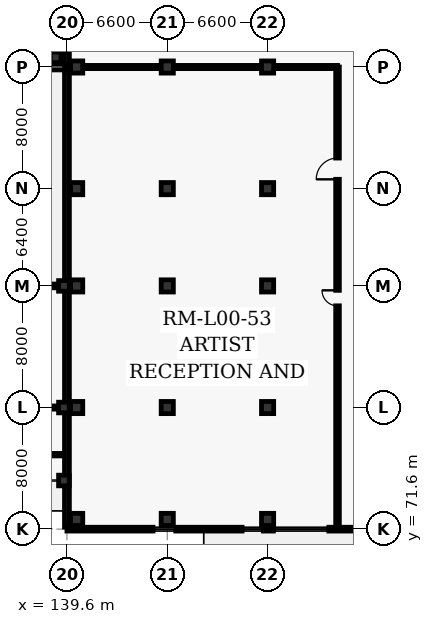
"""IFC4 building model, lengths in metres.
Left out: names, types, materials, properties, quantities, classifications, styles, units other than length and angle.
Written with IfcOpenShell. Run it as: python <this file> out.ifc"""

import sys

from ifc_helpers import new_model, si_unit, direction, frame, frame_2d, origin, origin_2d, place, context, subcontext, project, spatial, rectangle, extrude, element, fill, save


model = new_model("IFC4")
c1 = context("Model", 3, precision=1e-05, world=origin(), true_north=direction((0.0, 1.0)))
c2 = subcontext(c1, "Body", "Model", "MODEL_VIEW")
j1 = project(units=[si_unit("LENGTHUNIT", "METRE"), si_unit("PLANEANGLEUNIT", "RADIAN")], contexts=[c1])
p1 = place(None, origin())
s1 = spatial("IfcSite", under=j1, at=p1, CompositionType="ELEMENT")
p2 = place(p1, origin())
s2 = spatial("IfcBuilding", under=s1, at=p2, CompositionType="ELEMENT")
p3 = place(p2, origin())
s3 = spatial("IfcBuildingStorey", under=s2, at=p3, CompositionType="ELEMENT", Elevation=0.0)
for number, where, z_axis, x_axis in (
    (1, (138.86, 102.64, 0.0), (0.0, 0.0, 1.0), (1.0, 0.0, 0.0)),
    (2, (139.4, 74.8, 0.0), (0.0, 0.0, 1.0), (1.0, 0.0, 0.0)),
    (3, (139.4, 79.6, 0.0), (0.0, 0.0, 1.0), (1.0, 0.0, 0.0)),
    (4, (139.4, 87.6, 0.0), (0.0, 0.0, 1.0), (1.0, 0.0, 0.0)),
):
    element("IfcColumn", number, at=place(p3, frame(where, z_axis=z_axis, x_axis=x_axis)), inside=s3, PredefinedType="COLUMN", context=c2, shape_type="SweptSolid", body=[
        extrude(rectangle(XDim=0.7, YDim=0.7, at=origin_2d()), origin(), (0.0, 0.0, 1.0), 5.4),
    ])
for number, where, z_axis, x_axis in (
    (5, (140.24, 72.24, 0.0), (0.0, 0.0, 1.0), (1.0, 0.0, 0.0)),
    (6, (140.24, 79.6, 0.0), (0.0, 0.0, 1.0), (1.0, 0.0, 0.0)),
    (7, (140.24, 87.6, 0.0), (0.0, 0.0, 1.0), (1.0, 0.0, 0.0)),
    (8, (140.24, 94.0, 0.0), (0.0, 0.0, 1.0), (1.0, 0.0, 0.0)),
    (9, (140.24, 102.0, 0.0), (0.0, 0.0, 1.0), (1.0, 0.0, 0.0)),
    (10, (146.2, 72.24, 0.0), (0.0, 0.0, 1.0), (1.0, 0.0, 0.0)),
    (11, (146.2, 79.6, 0.0), (0.0, 0.0, 1.0), (1.0, 0.0, 0.0)),
    (12, (146.2, 87.6, 0.0), (0.0, 0.0, 1.0), (1.0, 0.0, 0.0)),
    (13, (146.2, 94.0, 0.0), (0.0, 0.0, 1.0), (1.0, 0.0, 0.0)),
    (14, (146.2, 102.0, 0.0), (0.0, 0.0, 1.0), (1.0, 0.0, 0.0)),
    (15, (152.8, 72.24, 0.0), (0.0, 0.0, 1.0), (1.0, 0.0, 0.0)),
    (16, (152.8, 79.6, 0.0), (0.0, 0.0, 1.0), (1.0, 0.0, 0.0)),
    (17, (152.8, 87.6, 0.0), (0.0, 0.0, 1.0), (1.0, 0.0, 0.0)),
    (18, (152.8, 94.0, 0.0), (0.0, 0.0, 1.0), (1.0, 0.0, 0.0)),
    (19, (152.8, 102.0, 0.0), (0.0, 0.0, 1.0), (1.0, 0.0, 0.0)),
):
    element("IfcColumn", number, at=place(p3, frame(where, z_axis=z_axis, x_axis=x_axis)), inside=s3, PredefinedType="COLUMN", context=c2, shape_type="SweptSolid", body=[
        extrude(rectangle(XDim=0.8, YDim=0.8, at=origin_2d()), origin(), (0.0, 0.0, 1.0), 5.4),
    ])
p4 = place(p3, frame((139.5, 102.0, 0.0), z_axis=(0.0, 0.0, 1.0), x_axis=(-1.0, 0.0, 0.0)))
e20 = element("IfcWall", 20, at=p4, inside=s3, PredefinedType="SOLIDWALL", context=c2, shape_type="SweptSolid", body=[
    extrude(rectangle(XDim=44.7, YDim=0.38, at=frame_2d((22.35, 0.0))), origin(), (0.0, 0.0, 1.0), 5.12),
])
p5 = place(p4, frame((39.7, 0.0, 0.0)))
e21 = element("IfcOpeningElement", 21, at=p5, cuts=e20, PredefinedType="OPENING", context=c2, shape_type="SweptSolid", body=[
    extrude(rectangle(XDim=2.0, YDim=2.5, at=frame_2d((1.0, 1.25))), frame((0.0, 0.2, 0.0), z_axis=(0.0, -1.0, 0.0), x_axis=(1.0, 0.0, 0.0)), (0.0, 0.0, 1.0), 0.4),
])
p6 = place(p4, frame((2.2, 0.0, 0.9)))
e22 = element("IfcOpeningElement", 22, at=p6, cuts=e20, PredefinedType="OPENING", context=c2, shape_type="SweptSolid", body=[
    extrude(rectangle(XDim=3.2, YDim=2.5, at=frame_2d((1.6, 1.25))), frame((0.0, 0.2, 0.0), z_axis=(0.0, -1.0, 0.0), x_axis=(1.0, 0.0, 0.0)), (0.0, 0.0, 1.0), 0.4),
])
p7 = place(p4, frame((9.05, 0.0, 0.9)))
e23 = element("IfcOpeningElement", 23, at=p7, cuts=e20, PredefinedType="OPENING", context=c2, shape_type="SweptSolid", body=[
    extrude(rectangle(XDim=3.3, YDim=2.5, at=frame_2d((1.65, 1.25))), frame((0.0, 0.2, 0.0), z_axis=(0.0, -1.0, 0.0), x_axis=(1.0, 0.0, 0.0)), (0.0, 0.0, 1.0), 0.4),
])
p8 = place(p4, frame((15.9, 0.0, 0.9)))
e24 = element("IfcOpeningElement", 24, at=p8, cuts=e20, PredefinedType="OPENING", context=c2, shape_type="SweptSolid", body=[
    extrude(rectangle(XDim=3.4, YDim=2.55, at=frame_2d((1.7, 1.275))), frame((0.0, 0.2, 0.0), z_axis=(0.0, -1.0, 0.0), x_axis=(1.0, 0.0, 0.0)), (0.0, 0.0, 1.0), 0.4),
])
p9 = place(p4, frame((22.75, 0.0, 0.9)))
e25 = element("IfcOpeningElement", 25, at=p9, cuts=e20, PredefinedType="OPENING", context=c2, shape_type="SweptSolid", body=[
    extrude(rectangle(XDim=3.5, YDim=2.55, at=frame_2d((1.75, 1.275))), frame((0.0, 0.2, 0.0), z_axis=(0.0, -1.0, 0.0), x_axis=(1.0, 0.0, 0.0)), (0.0, 0.0, 1.0), 0.4),
])
p10 = place(p4, frame((29.6, 0.0, 0.9)))
e26 = element("IfcOpeningElement", 26, at=p10, cuts=e20, PredefinedType="OPENING", context=c2, shape_type="SweptSolid", body=[
    extrude(rectangle(XDim=3.6, YDim=2.6, at=frame_2d((1.8, 1.3))), frame((0.0, 0.2, 0.0), z_axis=(0.0, -1.0, 0.0), x_axis=(1.0, 0.0, 0.0)), (0.0, 0.0, 1.0), 0.4),
])
p11 = place(p4, frame((35.0, 0.0, 0.9)))
e27 = element("IfcOpeningElement", 27, at=p11, cuts=e20, PredefinedType="OPENING", context=c2, shape_type="SweptSolid", body=[
    extrude(rectangle(XDim=3.8, YDim=2.6, at=frame_2d((1.9, 1.3))), frame((0.0, 0.2, 0.0), z_axis=(0.0, -1.0, 0.0), x_axis=(1.0, 0.0, 0.0)), (0.0, 0.0, 1.0), 0.4),
])
p12 = place(p3, frame((54.8, 87.6, 0.0), z_axis=(0.0, 0.0, 1.0), x_axis=(1.0, 0.0, 0.0)))
e28 = element("IfcWall", 28, at=p12, inside=s3, PredefinedType="SOLIDWALL", context=c2, shape_type="SweptSolid", body=[
    extrude(rectangle(XDim=84.6, YDim=0.25, at=frame_2d((42.3, 0.0))), origin(), (0.0, 0.0, 1.0), 4.29),
])
p13 = place(p12, frame((34.625, 0.0, 0.0)))
e29 = element("IfcOpeningElement", 29, at=p13, cuts=e28, PredefinedType="OPENING", context=c2, shape_type="SweptSolid", body=[
    extrude(rectangle(XDim=1.15, YDim=2.2, at=frame_2d((0.575, 1.1))), frame((0.0, 0.135, 0.0), z_axis=(0.0, -1.0, 0.0), x_axis=(1.0, 0.0, 0.0)), (0.0, 0.0, 1.0), 0.27),
])
p14 = place(p12, frame((62.2, 0.0, 0.0)))
e30 = element("IfcOpeningElement", 30, at=p14, cuts=e28, PredefinedType="OPENING", context=c2, shape_type="SweptSolid", body=[
    extrude(rectangle(XDim=2.0, YDim=2.5, at=frame_2d((1.0, 1.25))), frame((0.0, 0.135, 0.0), z_axis=(0.0, -1.0, 0.0), x_axis=(1.0, 0.0, 0.0)), (0.0, 0.0, 1.0), 0.27),
])
p15 = place(p12, frame((2.2, 0.0, 0.9)))
e31 = element("IfcOpeningElement", 31, at=p15, cuts=e28, PredefinedType="OPENING", context=c2, shape_type="SweptSolid", body=[
    extrude(rectangle(XDim=2.0, YDim=1.7, at=frame_2d((1.0, 0.85))), frame((0.0, 0.135, 0.0), z_axis=(0.0, -1.0, 0.0), x_axis=(1.0, 0.0, 0.0)), (0.0, 0.0, 1.0), 0.27),
])
p16 = place(p12, frame((15.7, 0.0, 0.9)))
e32 = element("IfcOpeningElement", 32, at=p16, cuts=e28, PredefinedType="OPENING", context=c2, shape_type="SweptSolid", body=[
    extrude(rectangle(XDim=2.2, YDim=1.7, at=frame_2d((1.1, 0.85))), frame((0.0, 0.135, 0.0), z_axis=(0.0, -1.0, 0.0), x_axis=(1.0, 0.0, 0.0)), (0.0, 0.0, 1.0), 0.27),
])
p17 = place(p12, frame((29.2, 0.0, 0.9)))
e33 = element("IfcOpeningElement", 33, at=p17, cuts=e28, PredefinedType="OPENING", context=c2, shape_type="SweptSolid", body=[
    extrude(rectangle(XDim=1.6, YDim=1.65, at=frame_2d((0.8, 0.825))), frame((0.0, 0.135, 0.0), z_axis=(0.0, -1.0, 0.0), x_axis=(1.0, 0.0, 0.0)), (0.0, 0.0, 1.0), 0.27),
])
p18 = place(p12, frame((42.7, 0.0, 0.9)))
e34 = element("IfcOpeningElement", 34, at=p18, cuts=e28, PredefinedType="OPENING", context=c2, shape_type="SweptSolid", body=[
    extrude(rectangle(XDim=2.6, YDim=1.75, at=frame_2d((1.3, 0.875))), frame((0.0, 0.135, 0.0), z_axis=(0.0, -1.0, 0.0), x_axis=(1.0, 0.0, 0.0)), (0.0, 0.0, 1.0), 0.27),
])
p19 = place(p12, frame((56.95, 0.0, 0.9)))
e35 = element("IfcOpeningElement", 35, at=p19, cuts=e28, PredefinedType="OPENING", context=c2, shape_type="SweptSolid", body=[
    extrude(rectangle(XDim=2.8, YDim=1.8, at=frame_2d((1.4, 0.9))), frame((0.0, 0.135, 0.0), z_axis=(0.0, -1.0, 0.0), x_axis=(1.0, 0.0, 0.0)), (0.0, 0.0, 1.0), 0.27),
])
p20 = place(p12, frame((68.25, 0.0, 0.9)))
e36 = element("IfcOpeningElement", 36, at=p20, cuts=e28, PredefinedType="OPENING", context=c2, shape_type="SweptSolid", body=[
    extrude(rectangle(XDim=3.0, YDim=1.8, at=frame_2d((1.5, 0.9))), frame((0.0, 0.135, 0.0), z_axis=(0.0, -1.0, 0.0), x_axis=(1.0, 0.0, 0.0)), (0.0, 0.0, 1.0), 0.27),
])
p21 = place(p3, frame((172.0, 71.6, 0.0), z_axis=(0.0, 0.0, 1.0), x_axis=(-1.0, 0.0, 0.0)))
e37 = element("IfcWall", 37, at=p21, inside=s3, PredefinedType="SOLIDWALL", context=c2, shape_type="SweptSolid", body=[
    extrude(rectangle(XDim=32.4, YDim=0.25, at=frame_2d((16.2, 0.0))), origin(), (0.0, 0.0, 1.0), 4.45),
])
p22 = place(p21, frame((1.9, 0.0, 0.0)))
e38 = element("IfcOpeningElement", 38, at=p22, cuts=e37, PredefinedType="OPENING", context=c2, shape_type="SweptSolid", body=[
    extrude(rectangle(XDim=2.0, YDim=2.5, at=frame_2d((1.0, 1.25))), frame((0.0, 0.135, 0.0), z_axis=(0.0, -1.0, 0.0), x_axis=(1.0, 0.0, 0.0)), (0.0, 0.0, 1.0), 0.27),
])
p23 = place(p21, frame((7.96, 0.0, 0.8)))
e39 = element("IfcOpeningElement", 39, at=p23, cuts=e37, PredefinedType="OPENING", context=c2, shape_type="SweptSolid", body=[
    extrude(rectangle(XDim=3.35, YDim=2.9, at=frame_2d((1.675, 1.45))), frame((0.0, 0.135, 0.0), z_axis=(0.0, -1.0, 0.0), x_axis=(1.0, 0.0, 0.0)), (0.0, 0.0, 1.0), 0.27),
])
p24 = place(p21, frame((15.17, 0.0, 0.8)))
e40 = element("IfcOpeningElement", 40, at=p24, cuts=e37, PredefinedType="OPENING", context=c2, shape_type="SweptSolid", body=[
    extrude(rectangle(XDim=3.65, YDim=2.9, at=frame_2d((1.825, 1.45))), frame((0.0, 0.135, 0.0), z_axis=(0.0, -1.0, 0.0), x_axis=(1.0, 0.0, 0.0)), (0.0, 0.0, 1.0), 0.27),
])
p25 = place(p21, frame((19.48, 0.0, 0.8)))
e41 = element("IfcOpeningElement", 41, at=p25, cuts=e37, PredefinedType="OPENING", context=c2, shape_type="SweptSolid", body=[
    extrude(rectangle(XDim=1.4, YDim=2.1, at=frame_2d((0.7, 1.05))), frame((0.0, 0.135, 0.0), z_axis=(0.0, -1.0, 0.0), x_axis=(1.0, 0.0, 0.0)), (0.0, 0.0, 1.0), 0.27),
])
p26 = place(p21, frame((25.24, 0.0, 0.8)))
e42 = element("IfcOpeningElement", 42, at=p26, cuts=e37, PredefinedType="OPENING", context=c2, shape_type="SweptSolid", body=[
    extrude(rectangle(XDim=1.5, YDim=2.1, at=frame_2d((0.75, 1.05))), frame((0.0, 0.135, 0.0), z_axis=(0.0, -1.0, 0.0), x_axis=(1.0, 0.0, 0.0)), (0.0, 0.0, 1.0), 0.27),
])
p27 = place(p3, frame((139.6, 71.74, 0.0), z_axis=(0.0, 0.0, 1.0), x_axis=(0.0, 1.0, 0.0)))
e43 = element("IfcWall", 43, at=p27, inside=s3, PredefinedType="SOLIDWALL", context=c2, shape_type="SweptSolid", body=[
    extrude(rectangle(XDim=46.12, YDim=0.32, at=frame_2d((23.06, 0.0))), origin(), (0.0, 0.0, 1.0), 4.29),
])
p28 = place(p27, frame((31.38, 0.0, 0.0)))
e44 = element("IfcOpeningElement", 44, at=p28, cuts=e43, PredefinedType="OPENING", context=c2, shape_type="SweptSolid", body=[
    extrude(rectangle(XDim=1.4, YDim=2.25, at=frame_2d((0.7, 1.125))), frame((0.0, 0.17, 0.0), z_axis=(0.0, -1.0, 0.0), x_axis=(1.0, 0.0, 0.0)), (0.0, 0.0, 1.0), 0.34),
])
p29 = place(p3, frame((139.4, 76.5, 0.0), z_axis=(0.0, 0.0, 1.0), x_axis=(-1.0, 0.0, 0.0)))
e45 = element("IfcWall", 45, at=p29, inside=s3, PredefinedType="PARTITIONING", context=c2, shape_type="SweptSolid", body=[
    extrude(rectangle(XDim=44.6, YDim=0.165, at=frame_2d((22.3, 0.0))), origin(), (0.0, 0.0, 1.0), 5.14),
])
p30 = place(p29, frame((21.825, 0.0, 0.0)))
e46 = element("IfcOpeningElement", 46, at=p30, cuts=e45, PredefinedType="OPENING", context=c2, shape_type="SweptSolid", body=[
    extrude(rectangle(XDim=0.95, YDim=2.1, at=frame_2d((0.475, 1.05))), frame((0.0, 0.093, 0.0), z_axis=(0.0, -1.0, 0.0), x_axis=(1.0, 0.0, 0.0)), (0.0, 0.0, 1.0), 0.185),
])
p31 = place(p3, frame((95.152, 79.6, 0.0), z_axis=(0.0, 0.0, 1.0), x_axis=(1.0, 0.0, 0.0)))
e47 = element("IfcWall", 47, at=p31, inside=s3, PredefinedType="PARTITIONING", context=c2, shape_type="SweptSolid", body=[
    extrude(rectangle(XDim=43.896, YDim=0.21, at=frame_2d((21.948, 0.0))), origin(), (0.0, 0.0, 1.0), 4.29),
])
p32 = place(p31, frame((21.423, 0.0, 0.0)))
e48 = element("IfcOpeningElement", 48, at=p32, cuts=e47, PredefinedType="OPENING", context=c2, shape_type="SweptSolid", body=[
    extrude(rectangle(XDim=1.05, YDim=2.15, at=frame_2d((0.525, 1.075))), frame((0.0, 0.115, 0.0), z_axis=(0.0, -1.0, 0.0), x_axis=(1.0, 0.0, 0.0)), (0.0, 0.0, 1.0), 0.23),
])
p33 = place(p31, frame((33.539, 0.0, 0.0)))
e49 = element("IfcOpeningElement", 49, at=p33, cuts=e47, PredefinedType="OPENING", context=c2, shape_type="SweptSolid", body=[
    extrude(rectangle(XDim=1.4, YDim=2.25, at=frame_2d((0.7, 1.125))), frame((0.0, 0.115, 0.0), z_axis=(0.0, -1.0, 0.0), x_axis=(1.0, 0.0, 0.0)), (0.0, 0.0, 1.0), 0.23),
])
p34 = place(p3, frame((157.4, 102.0, 0.0), z_axis=(0.0, 0.0, 1.0), x_axis=(-1.0, 0.0, 0.0)))
e50 = element("IfcWall", 50, at=p34, inside=s3, PredefinedType="PARTITIONING", context=c2, shape_type="SweptSolid", body=[
    extrude(rectangle(XDim=17.8, YDim=0.21, at=frame_2d((8.9, 0.0))), origin(), (0.0, 0.0, 1.0), 4.49),
])
p35 = place(p3, frame((157.4, 71.6, 0.0), z_axis=(0.0, 0.0, 1.0), x_axis=(0.0, 1.0, 0.0)))
e51 = element("IfcWall", 51, at=p35, inside=s3, PredefinedType="PARTITIONING", context=c2, shape_type="SweptSolid", body=[
    extrude(rectangle(XDim=30.4, YDim=0.24, at=frame_2d((15.2, 0.0))), origin(), (0.0, 0.0, 1.0), 5.14),
])
p36 = place(p35, frame((14.69, 0.0, 0.0)))
e52 = element("IfcOpeningElement", 52, at=p36, cuts=e51, PredefinedType="OPENING", context=c2, shape_type="SweptSolid", body=[
    extrude(rectangle(XDim=1.02, YDim=2.1, at=frame_2d((0.51, 1.05))), frame((0.0, 0.13, 0.0), z_axis=(0.0, -1.0, 0.0), x_axis=(1.0, 0.0, 0.0)), (0.0, 0.0, 1.0), 0.26),
])
p37 = place(p35, frame((23.012, 0.0, 0.0)))
e53 = element("IfcOpeningElement", 53, at=p37, cuts=e51, PredefinedType="OPENING", context=c2, shape_type="SweptSolid", body=[
    extrude(rectangle(XDim=1.4, YDim=2.25, at=frame_2d((0.7, 1.125))), frame((0.0, 0.13, 0.0), z_axis=(0.0, -1.0, 0.0), x_axis=(1.0, 0.0, 0.0)), (0.0, 0.0, 1.0), 0.26),
])
p38 = place(p24, origin())
e54 = element("IfcWindow", 54, at=p38, inside=s3, PartitioningType="SINGLE_PANEL", PredefinedType="WINDOW", context=c2, shape_type="SweptSolid", body=[
    extrude(rectangle(XDim=3.65, YDim=2.9, at=frame_2d((1.825, 1.45))), frame((0.0, 0.03, 0.0), z_axis=(0.0, -1.0, 0.0), x_axis=(1.0, 0.0, 0.0)), (0.0, 0.0, 1.0), 0.06),
])
fill(e40, e54)
p39 = place(p25, origin())
e55 = element("IfcWindow", 55, at=p39, inside=s3, PartitioningType="SINGLE_PANEL", PredefinedType="WINDOW", context=c2, shape_type="SweptSolid", body=[
    extrude(rectangle(XDim=1.4, YDim=2.1, at=frame_2d((0.7, 1.05))), frame((0.0, 0.03, 0.0), z_axis=(0.0, -1.0, 0.0), x_axis=(1.0, 0.0, 0.0)), (0.0, 0.0, 1.0), 0.06),
])
fill(e41, e55)
p40 = place(p26, origin())
e56 = element("IfcWindow", 56, at=p40, inside=s3, PartitioningType="SINGLE_PANEL", PredefinedType="WINDOW", context=c2, shape_type="SweptSolid", body=[
    extrude(rectangle(XDim=1.5, YDim=2.1, at=frame_2d((0.75, 1.05))), frame((0.0, 0.03, 0.0), z_axis=(0.0, -1.0, 0.0), x_axis=(1.0, 0.0, 0.0)), (0.0, 0.0, 1.0), 0.06),
])
fill(e42, e56)
p41 = place(p36, origin())
e57 = element("IfcDoor", 57, at=p41, inside=s3, OperationType="SINGLE_SWING_RIGHT", PredefinedType="DOOR", context=c2, shape_type="SweptSolid", body=[
    extrude(rectangle(XDim=1.02, YDim=2.1, at=frame_2d((0.51, 1.05))), frame((0.0, 0.025, 0.0), z_axis=(0.0, -1.0, 0.0), x_axis=(1.0, 0.0, 0.0)), (0.0, 0.0, 1.0), 0.05),
])
fill(e52, e57)
p42 = place(p37, origin())
e58 = element("IfcDoor", 58, at=p42, inside=s3, OperationType="SINGLE_SWING_LEFT", PredefinedType="DOOR", context=c2, shape_type="SweptSolid", body=[
    extrude(rectangle(XDim=1.4, YDim=2.25, at=frame_2d((0.7, 1.125))), frame((0.0, 0.025, 0.0), z_axis=(0.0, -1.0, 0.0), x_axis=(1.0, 0.0, 0.0)), (0.0, 0.0, 1.0), 0.05),
])
fill(e53, e58)
save(model, sys.argv[1])
